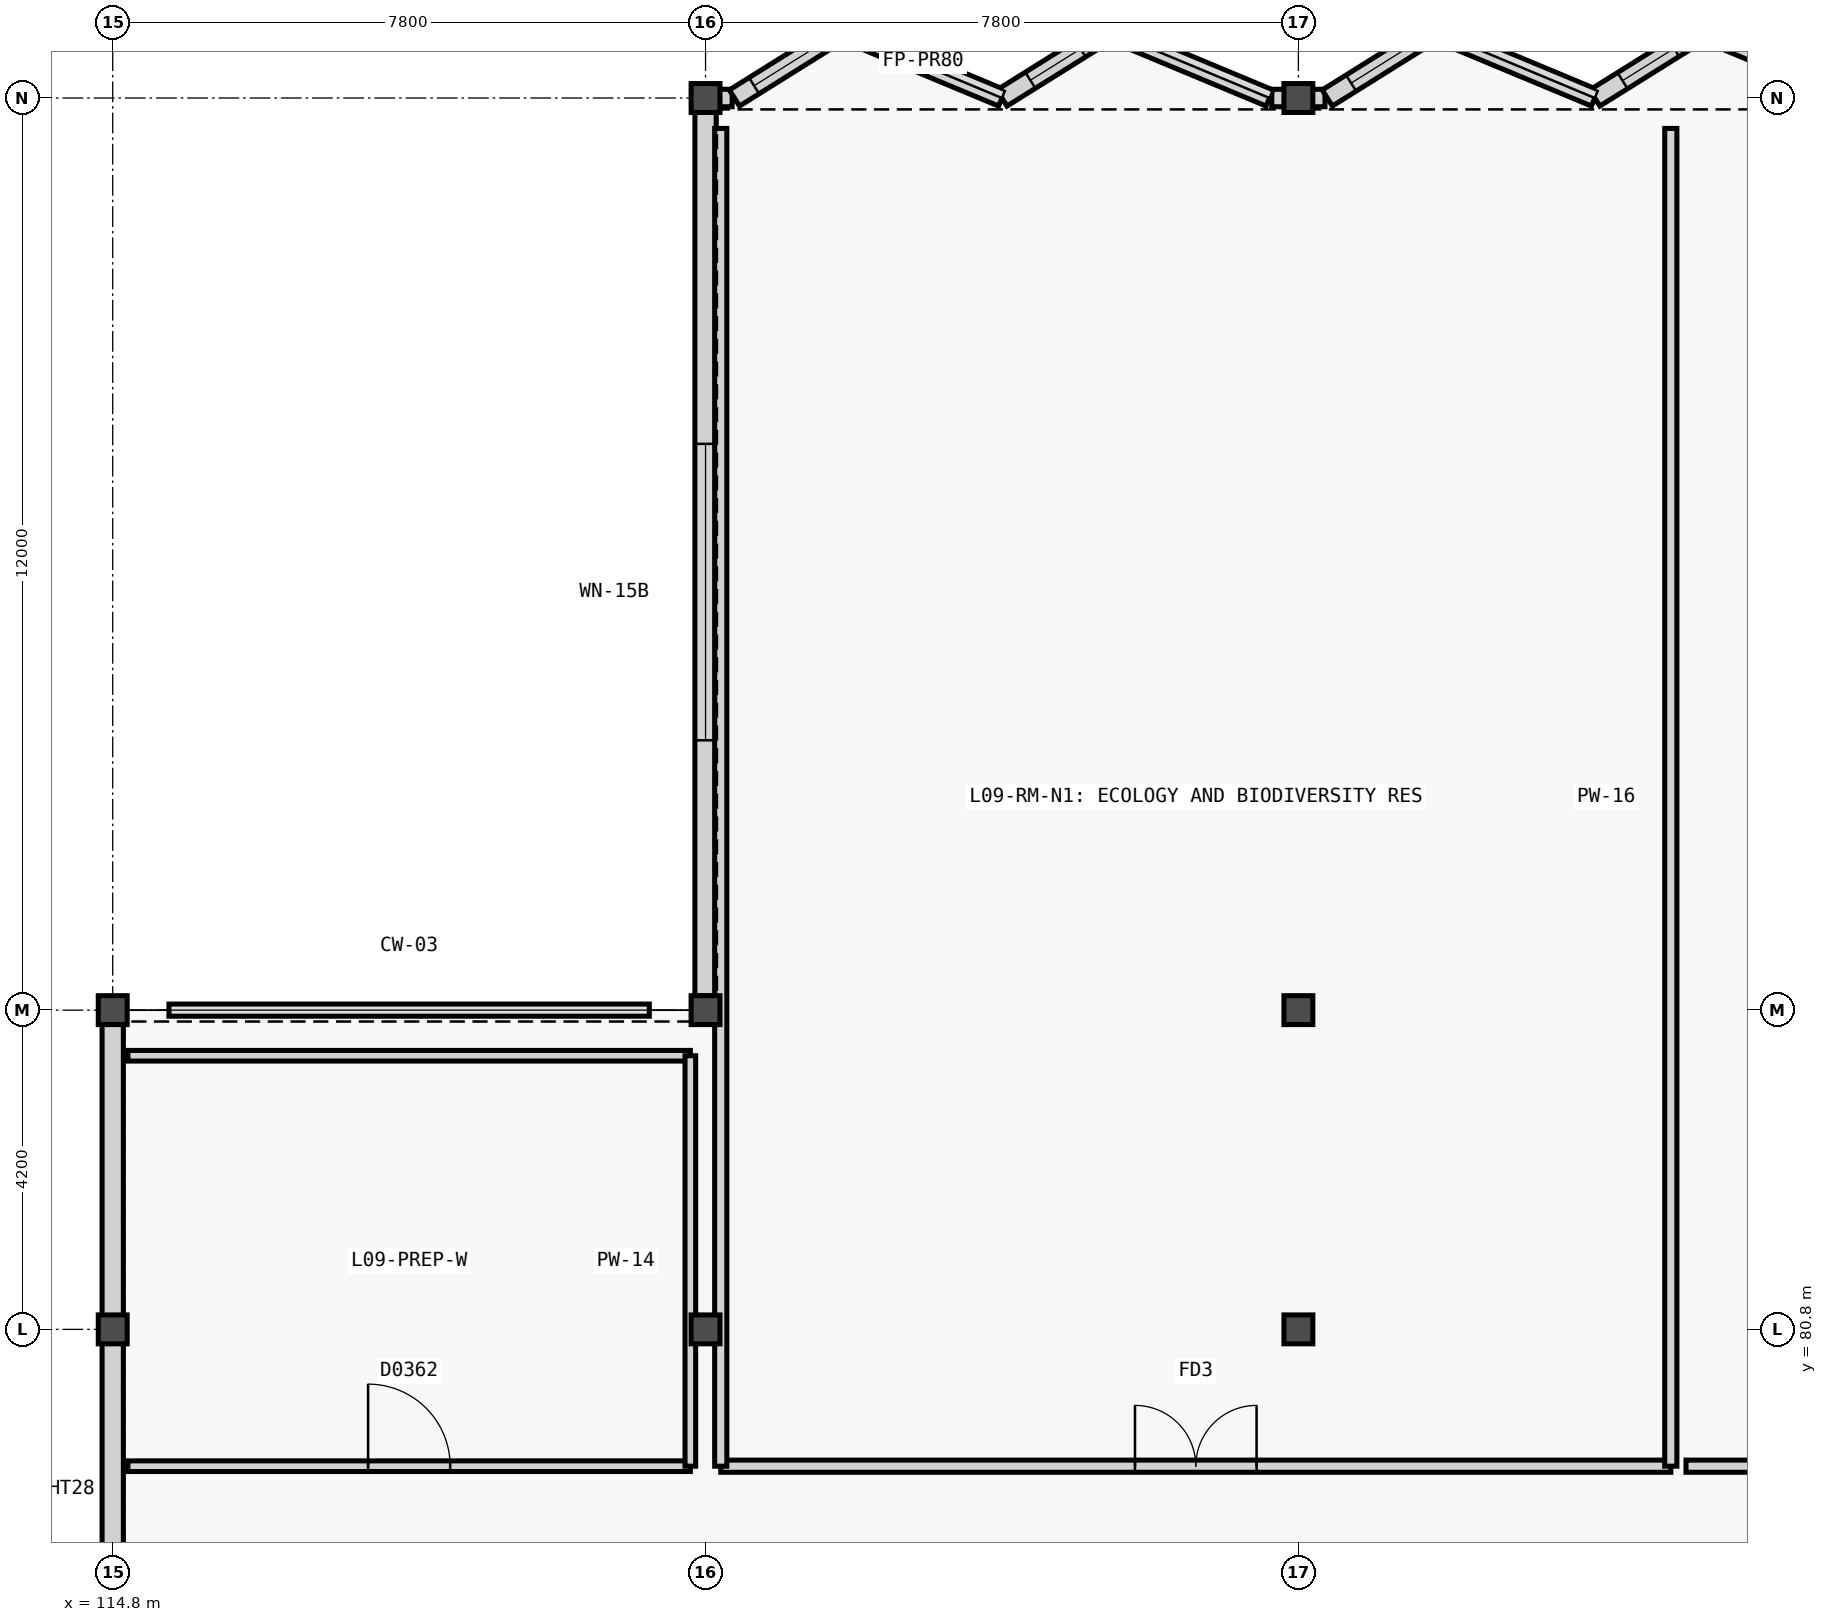
"""IFC4 building model, lengths in metres.
Left out: names, types, materials, properties, quantities, classifications, styles, units other than length and angle.
Written with IfcOpenShell. Run it as: python <this file> out.ifc"""

import sys

from ifc_helpers import new_model, si_unit, direction, frame, frame_2d, origin, origin_2d, place, context, subcontext, project, spatial, rectangle, extrude, element, fill, save


model = new_model("IFC4")
c1 = context("Model", 3, precision=1e-05, world=origin(), true_north=direction((0.0, 1.0)))
c2 = subcontext(c1, "Body", "Model", "MODEL_VIEW")
j1 = project(units=[si_unit("LENGTHUNIT", "METRE"), si_unit("PLANEANGLEUNIT", "RADIAN")], contexts=[c1])
p1 = place(None, origin())
s1 = spatial("IfcSite", under=j1, at=p1, CompositionType="ELEMENT")
p2 = place(p1, origin())
s2 = spatial("IfcBuilding", under=s1, at=p2, CompositionType="ELEMENT")
p3 = place(p2, frame((0.0, 0.0, 36.0)))
s3 = spatial("IfcBuildingStorey", under=s2, at=p3, CompositionType="ELEMENT", Elevation=36.0)
for number, where, z_axis, x_axis in (
    (1, (114.8, 80.8, 0.0), (0.0, 0.0, 1.0), (1.0, 0.0, 0.0)),
    (2, (114.8, 85.0, 0.0), (0.0, 0.0, 1.0), (1.0, 0.0, 0.0)),
    (3, (122.6, 80.8, 0.0), (0.0, 0.0, 1.0), (1.0, 0.0, 0.0)),
    (4, (122.6, 85.0, 0.0), (0.0, 0.0, 1.0), (1.0, 0.0, 0.0)),
    (5, (122.6, 97.0, 0.0), (0.0, 0.0, 1.0), (1.0, 0.0, 0.0)),
    (6, (130.4, 80.8, 0.0), (0.0, 0.0, 1.0), (1.0, 0.0, 0.0)),
    (7, (130.4, 85.0, 0.0), (0.0, 0.0, 1.0), (1.0, 0.0, 0.0)),
    (8, (130.4, 97.0, 0.0), (0.0, 0.0, 1.0), (1.0, 0.0, 0.0)),
):
    element("IfcColumn", number, at=place(p3, frame(where, z_axis=z_axis, x_axis=x_axis)), inside=s3, PredefinedType="COLUMN", context=c2, shape_type="SweptSolid", body=[
        extrude(rectangle(XDim=0.38, YDim=0.38, at=origin_2d()), origin(), (0.0, 0.0, 1.0), 3.6),
    ])
p4 = place(p3, frame((122.6, 85.188, 0.0), z_axis=(0.0, 0.0, 1.0), x_axis=(0.0, 1.0, 0.0)))
e9 = element("IfcWall", 9, at=p4, inside=s3, PredefinedType="SOLIDWALL", context=c2, shape_type="SweptSolid", body=[
    extrude(rectangle(XDim=11.624, YDim=0.28, at=frame_2d((5.812, 0.0))), origin(), (0.0, 0.0, 1.0), 2.9),
])
p5 = place(p4, frame((3.362, 0.0, 0.82)))
e10 = element("IfcOpeningElement", 10, at=p5, cuts=e9, PredefinedType="OPENING", context=c2, shape_type="SweptSolid", body=[
    extrude(rectangle(XDim=3.9, YDim=1.45, at=frame_2d((1.95, 0.725))), frame((0.0, 0.15, 0.0), z_axis=(0.0, -1.0, 0.0), x_axis=(1.0, 0.0, 0.0)), (0.0, 0.0, 1.0), 0.3),
])
p6 = place(p3, frame((114.8, 72.588, 0.0), z_axis=(0.0, 0.0, 1.0), x_axis=(0.0, 1.0, 0.0)))
e11 = element("IfcWall", 11, at=p6, inside=s3, PredefinedType="SOLIDWALL", context=c2, shape_type="SweptSolid", body=[
    extrude(rectangle(XDim=12.224, YDim=0.28, at=frame_2d((6.112, 0.0))), origin(), (0.0, 0.0, 1.0), 2.8),
])
for number, where, z_axis, x_axis in (
    (12, (122.6, 97.0, 0.0), (0.0, 0.0, 1.0), (1.0, 0.0, 0.0)),
    (13, (130.05, 97.0, 0.0), (0.0, 0.0, 1.0), (1.0, 0.0, 0.0)),
):
    element("IfcWall", number, at=place(p3, frame(where, z_axis=z_axis, x_axis=x_axis)), inside=s3, PredefinedType="SOLIDWALL", context=c2, shape_type="SweptSolid", body=[
        extrude(rectangle(XDim=0.35, YDim=0.23, at=frame_2d((0.175, 0.0))), origin(), (0.0, 0.0, 1.0), 3.36),
    ])
p7 = place(p3, frame((130.4, 97.0, 0.0), z_axis=(0.0, 0.0, 1.0), x_axis=(1.0, 0.0, 0.0)))
e14 = element("IfcWall", 14, at=p7, inside=s3, PredefinedType="SOLIDWALL", context=c2, shape_type="SweptSolid", body=[
    extrude(rectangle(XDim=0.35, YDim=0.23, at=frame_2d((0.175, 0.0))), origin(), (0.0, 0.0, 1.0), 3.36),
])
p8 = place(p3, frame((122.98, 97.0, 0.0), z_axis=(0.0, 0.0, 1.0), x_axis=(0.848023086369, 0.529959286158, 0.0)))
e15 = element("IfcWall", 15, at=p8, inside=s3, PredefinedType="SOLIDWALL", context=c2, shape_type="SweptSolid", body=[
    extrude(rectangle(XDim=1.66, YDim=0.25, at=frame_2d((0.83, 0.0))), origin(), (0.0, 0.0, 1.0), 3.36),
])
p9 = place(p8, frame((0.305, 0.0, 0.82)))
e16 = element("IfcOpeningElement", 16, at=p9, cuts=e15, PredefinedType="OPENING", context=c2, shape_type="SweptSolid", body=[
    extrude(rectangle(XDim=1.05, YDim=1.4, at=frame_2d((0.525, 0.7))), frame((0.0, 0.135, 0.0), z_axis=(0.0, -1.0, 0.0), x_axis=(1.0, 0.0, 0.0)), (0.0, 0.0, 1.0), 0.27),
])
p10 = place(p3, frame((124.388, 97.88, 0.0), z_axis=(0.0, 0.0, 1.0), x_axis=(0.92309902008, -0.384562347517, 0.0)))
e17 = element("IfcWall", 17, at=p10, inside=s3, PredefinedType="SOLIDWALL", context=c2, shape_type="SweptSolid", body=[
    extrude(rectangle(XDim=2.288, YDim=0.23, at=frame_2d((1.144, 0.0))), origin(), (0.0, 0.0, 1.0), 3.36),
])
p11 = place(p3, frame((126.5, 97.0, 0.0), z_axis=(0.0, 0.0, 1.0), x_axis=(0.848023086369, 0.529959286158, 0.0)))
e18 = element("IfcWall", 18, at=p11, inside=s3, PredefinedType="SOLIDWALL", context=c2, shape_type="SweptSolid", body=[
    extrude(rectangle(XDim=1.66, YDim=0.25, at=frame_2d((0.83, 0.0))), origin(), (0.0, 0.0, 1.0), 3.36),
])
p12 = place(p11, frame((0.44, 0.0, 0.82)))
e19 = element("IfcOpeningElement", 19, at=p12, cuts=e18, PredefinedType="OPENING", context=c2, shape_type="SweptSolid", body=[
    extrude(rectangle(XDim=0.78, YDim=1.3, at=frame_2d((0.39, 0.65))), frame((0.0, 0.135, 0.0), z_axis=(0.0, -1.0, 0.0), x_axis=(1.0, 0.0, 0.0)), (0.0, 0.0, 1.0), 0.27),
])
p13 = place(p3, frame((127.908, 97.88, 0.0), z_axis=(0.0, 0.0, 1.0), x_axis=(0.92309902008, -0.384562347517, 0.0)))
e20 = element("IfcWall", 20, at=p13, inside=s3, PredefinedType="SOLIDWALL", context=c2, shape_type="SweptSolid", body=[
    extrude(rectangle(XDim=2.288, YDim=0.23, at=frame_2d((1.144, 0.0))), origin(), (0.0, 0.0, 1.0), 3.36),
])
p14 = place(p3, frame((130.78, 97.0, 0.0), z_axis=(0.0, 0.0, 1.0), x_axis=(0.848023086369, 0.529959286158, 0.0)))
e21 = element("IfcWall", 21, at=p14, inside=s3, PredefinedType="SOLIDWALL", context=c2, shape_type="SweptSolid", body=[
    extrude(rectangle(XDim=1.66, YDim=0.25, at=frame_2d((0.83, 0.0))), origin(), (0.0, 0.0, 1.0), 3.36),
])
p15 = place(p14, frame((0.37, 0.0, 0.82)))
e22 = element("IfcOpeningElement", 22, at=p15, cuts=e21, PredefinedType="OPENING", context=c2, shape_type="SweptSolid", body=[
    extrude(rectangle(XDim=0.92, YDim=1.38, at=frame_2d((0.46, 0.69))), frame((0.0, 0.135, 0.0), z_axis=(0.0, -1.0, 0.0), x_axis=(1.0, 0.0, 0.0)), (0.0, 0.0, 1.0), 0.27),
])
p16 = place(p3, frame((132.188, 97.88, 0.0), z_axis=(0.0, 0.0, 1.0), x_axis=(0.92309902008, -0.384562347517, 0.0)))
e23 = element("IfcWall", 23, at=p16, inside=s3, PredefinedType="SOLIDWALL", context=c2, shape_type="SweptSolid", body=[
    extrude(rectangle(XDim=2.288, YDim=0.23, at=frame_2d((1.144, 0.0))), origin(), (0.0, 0.0, 1.0), 3.36),
])
p17 = place(p3, frame((134.3, 97.0, 0.0), z_axis=(0.0, 0.0, 1.0), x_axis=(0.848023086369, 0.529959286158, 0.0)))
e24 = element("IfcWall", 24, at=p17, inside=s3, PredefinedType="SOLIDWALL", context=c2, shape_type="SweptSolid", body=[
    extrude(rectangle(XDim=1.66, YDim=0.25, at=frame_2d((0.83, 0.0))), origin(), (0.0, 0.0, 1.0), 3.36),
])
p18 = place(p17, frame((0.43, 0.0, 0.82)))
e25 = element("IfcOpeningElement", 25, at=p18, cuts=e24, PredefinedType="OPENING", context=c2, shape_type="SweptSolid", body=[
    extrude(rectangle(XDim=0.8, YDim=1.35, at=frame_2d((0.4, 0.675))), frame((0.0, 0.135, 0.0), z_axis=(0.0, -1.0, 0.0), x_axis=(1.0, 0.0, 0.0)), (0.0, 0.0, 1.0), 0.27),
])
p19 = place(p3, frame((135.708, 97.88, 0.0), z_axis=(0.0, 0.0, 1.0), x_axis=(0.92309902008, -0.384562347517, 0.0)))
e26 = element("IfcWall", 26, at=p19, inside=s3, PredefinedType="SOLIDWALL", context=c2, shape_type="SweptSolid", body=[
    extrude(rectangle(XDim=2.288, YDim=0.23, at=frame_2d((1.144, 0.0))), origin(), (0.0, 0.0, 1.0), 3.36),
])
p20 = place(p3, frame((115.0, 79.0, 0.0), z_axis=(0.0, 0.0, 1.0), x_axis=(1.0, 0.0, 0.0)))
e27 = element("IfcWall", 27, at=p20, inside=s3, PredefinedType="PARTITIONING", context=c2, shape_type="SweptSolid", body=[
    extrude(rectangle(XDim=7.4, YDim=0.14, at=frame_2d((3.7, 0.0))), origin(), (0.0, 0.0, 1.0), 3.34),
])
p21 = place(p20, frame((3.16, 0.0, 0.0)))
e28 = element("IfcOpeningElement", 28, at=p21, cuts=e27, PredefinedType="OPENING", context=c2, shape_type="SweptSolid", body=[
    extrude(rectangle(XDim=1.08, YDim=2.2, at=frame_2d((0.54, 1.1))), frame((0.0, 0.08, 0.0), z_axis=(0.0, -1.0, 0.0), x_axis=(1.0, 0.0, 0.0)), (0.0, 0.0, 1.0), 0.16),
])
p22 = place(p3, frame((115.0, 84.4, 0.0), z_axis=(0.0, 0.0, 1.0), x_axis=(1.0, 0.0, 0.0)))
e29 = element("IfcWall", 29, at=p22, inside=s3, PredefinedType="PARTITIONING", context=c2, shape_type="SweptSolid", body=[
    extrude(rectangle(XDim=7.4, YDim=0.14, at=frame_2d((3.7, 0.0))), origin(), (0.0, 0.0, 1.0), 3.34),
])
p23 = place(p3, frame((122.4, 79.0, 0.0), z_axis=(0.0, 0.0, 1.0), x_axis=(0.0, 1.0, 0.0)))
e30 = element("IfcWall", 30, at=p23, inside=s3, PredefinedType="PARTITIONING", context=c2, shape_type="SweptSolid", body=[
    extrude(rectangle(XDim=5.4, YDim=0.14, at=frame_2d((2.7, 0.0))), origin(), (0.0, 0.0, 1.0), 2.88),
])
p24 = place(p3, frame((122.8, 79.0, 0.0), z_axis=(0.0, 0.0, 1.0), x_axis=(1.0, 0.0, 0.0)))
e31 = element("IfcWall", 31, at=p24, inside=s3, PredefinedType="PARTITIONING", context=c2, shape_type="SweptSolid", body=[
    extrude(rectangle(XDim=12.5, YDim=0.16, at=frame_2d((6.25, 0.0))), origin(), (0.0, 0.0, 1.0), 3.34),
])
p25 = place(p24, frame((5.45, 0.0, 0.0)))
e32 = element("IfcOpeningElement", 32, at=p25, cuts=e31, PredefinedType="OPENING", context=c2, shape_type="SweptSolid", body=[
    extrude(rectangle(XDim=1.6, YDim=2.2, at=frame_2d((0.8, 1.1))), frame((0.0, 0.09, 0.0), z_axis=(0.0, -1.0, 0.0), x_axis=(1.0, 0.0, 0.0)), (0.0, 0.0, 1.0), 0.18),
])
p26 = place(p3, frame((122.8, 79.0, 0.0), z_axis=(0.0, 0.0, 1.0), x_axis=(0.0, 1.0, 0.0)))
e33 = element("IfcWall", 33, at=p26, inside=s3, PredefinedType="PARTITIONING", context=c2, shape_type="SweptSolid", body=[
    extrude(rectangle(XDim=17.6, YDim=0.16, at=frame_2d((8.8, 0.0))), origin(), (0.0, 0.0, 1.0), 2.88),
])
p27 = place(p3, frame((135.3, 79.0, 0.0), z_axis=(0.0, 0.0, 1.0), x_axis=(0.0, 1.0, 0.0)))
e34 = element("IfcWall", 34, at=p27, inside=s3, PredefinedType="PARTITIONING", context=c2, shape_type="SweptSolid", body=[
    extrude(rectangle(XDim=17.6, YDim=0.16, at=frame_2d((8.8, 0.0))), origin(), (0.0, 0.0, 1.0), 3.34),
])
p28 = place(p3, frame((135.5, 79.0, 0.0), z_axis=(0.0, 0.0, 1.0), x_axis=(1.0, 0.0, 0.0)))
e35 = element("IfcWall", 35, at=p28, inside=s3, PredefinedType="PARTITIONING", context=c2, shape_type="SweptSolid", body=[
    extrude(rectangle(XDim=12.8, YDim=0.16, at=frame_2d((6.4, 0.0))), origin(), (0.0, 0.0, 1.0), 3.34),
])
p29 = place(p28, frame((5.6, 0.0, 0.0)))
e36 = element("IfcOpeningElement", 36, at=p29, cuts=e35, PredefinedType="OPENING", context=c2, shape_type="SweptSolid", body=[
    extrude(rectangle(XDim=1.6, YDim=2.2, at=frame_2d((0.8, 1.1))), frame((0.0, 0.09, 0.0), z_axis=(0.0, -1.0, 0.0), x_axis=(1.0, 0.0, 0.0)), (0.0, 0.0, 1.0), 0.18),
])
p30 = place(p5, origin())
e37 = element("IfcWindow", 37, at=p30, inside=s3, PartitioningType="SINGLE_PANEL", PredefinedType="WINDOW", context=c2, shape_type="SweptSolid", body=[
    extrude(rectangle(XDim=3.9, YDim=1.45, at=frame_2d((1.95, 0.725))), frame((0.0, 0.03, 0.0), z_axis=(0.0, -1.0, 0.0), x_axis=(1.0, 0.0, 0.0)), (0.0, 0.0, 1.0), 0.06),
])
fill(e10, e37)
p31 = place(p9, origin())
e38 = element("IfcWindow", 38, at=p31, inside=s3, PartitioningType="SINGLE_PANEL", PredefinedType="WINDOW", context=c2, shape_type="SweptSolid", body=[
    extrude(rectangle(XDim=1.05, YDim=1.4, at=frame_2d((0.525, 0.7))), frame((0.0, 0.03, 0.0), z_axis=(0.0, -1.0, 0.0), x_axis=(1.0, 0.0, 0.0)), (0.0, 0.0, 1.0), 0.06),
])
fill(e16, e38)
p32 = place(p12, origin())
e39 = element("IfcWindow", 39, at=p32, inside=s3, PartitioningType="SINGLE_PANEL", PredefinedType="WINDOW", context=c2, shape_type="SweptSolid", body=[
    extrude(rectangle(XDim=0.78, YDim=1.3, at=frame_2d((0.39, 0.65))), frame((0.0, 0.03, 0.0), z_axis=(0.0, -1.0, 0.0), x_axis=(1.0, 0.0, 0.0)), (0.0, 0.0, 1.0), 0.06),
])
fill(e19, e39)
p33 = place(p15, origin())
e40 = element("IfcWindow", 40, at=p33, inside=s3, PartitioningType="SINGLE_PANEL", PredefinedType="WINDOW", context=c2, shape_type="SweptSolid", body=[
    extrude(rectangle(XDim=0.92, YDim=1.38, at=frame_2d((0.46, 0.69))), frame((0.0, 0.03, 0.0), z_axis=(0.0, -1.0, 0.0), x_axis=(1.0, 0.0, 0.0)), (0.0, 0.0, 1.0), 0.06),
])
fill(e22, e40)
p34 = place(p18, origin())
e41 = element("IfcWindow", 41, at=p34, inside=s3, PartitioningType="SINGLE_PANEL", PredefinedType="WINDOW", context=c2, shape_type="SweptSolid", body=[
    extrude(rectangle(XDim=0.8, YDim=1.35, at=frame_2d((0.4, 0.675))), frame((0.0, 0.03, 0.0), z_axis=(0.0, -1.0, 0.0), x_axis=(1.0, 0.0, 0.0)), (0.0, 0.0, 1.0), 0.06),
])
fill(e25, e41)
p35 = place(p21, origin())
e42 = element("IfcDoor", 42, at=p35, inside=s3, OperationType="SINGLE_SWING_LEFT", PredefinedType="DOOR", context=c2, shape_type="SweptSolid", body=[
    extrude(rectangle(XDim=1.08, YDim=2.2, at=frame_2d((0.54, 1.1))), frame((0.0, 0.025, 0.0), z_axis=(0.0, -1.0, 0.0), x_axis=(1.0, 0.0, 0.0)), (0.0, 0.0, 1.0), 0.05),
])
fill(e28, e42)
p36 = place(p25, origin())
e43 = element("IfcDoor", 43, at=p36, inside=s3, OperationType="DOUBLE_DOOR_SINGLE_SWING", PredefinedType="DOOR", context=c2, shape_type="SweptSolid", body=[
    extrude(rectangle(XDim=1.6, YDim=2.2, at=frame_2d((0.8, 1.1))), frame((0.0, 0.025, 0.0), z_axis=(0.0, -1.0, 0.0), x_axis=(1.0, 0.0, 0.0)), (0.0, 0.0, 1.0), 0.05),
])
fill(e32, e43)
save(model, sys.argv[1])
